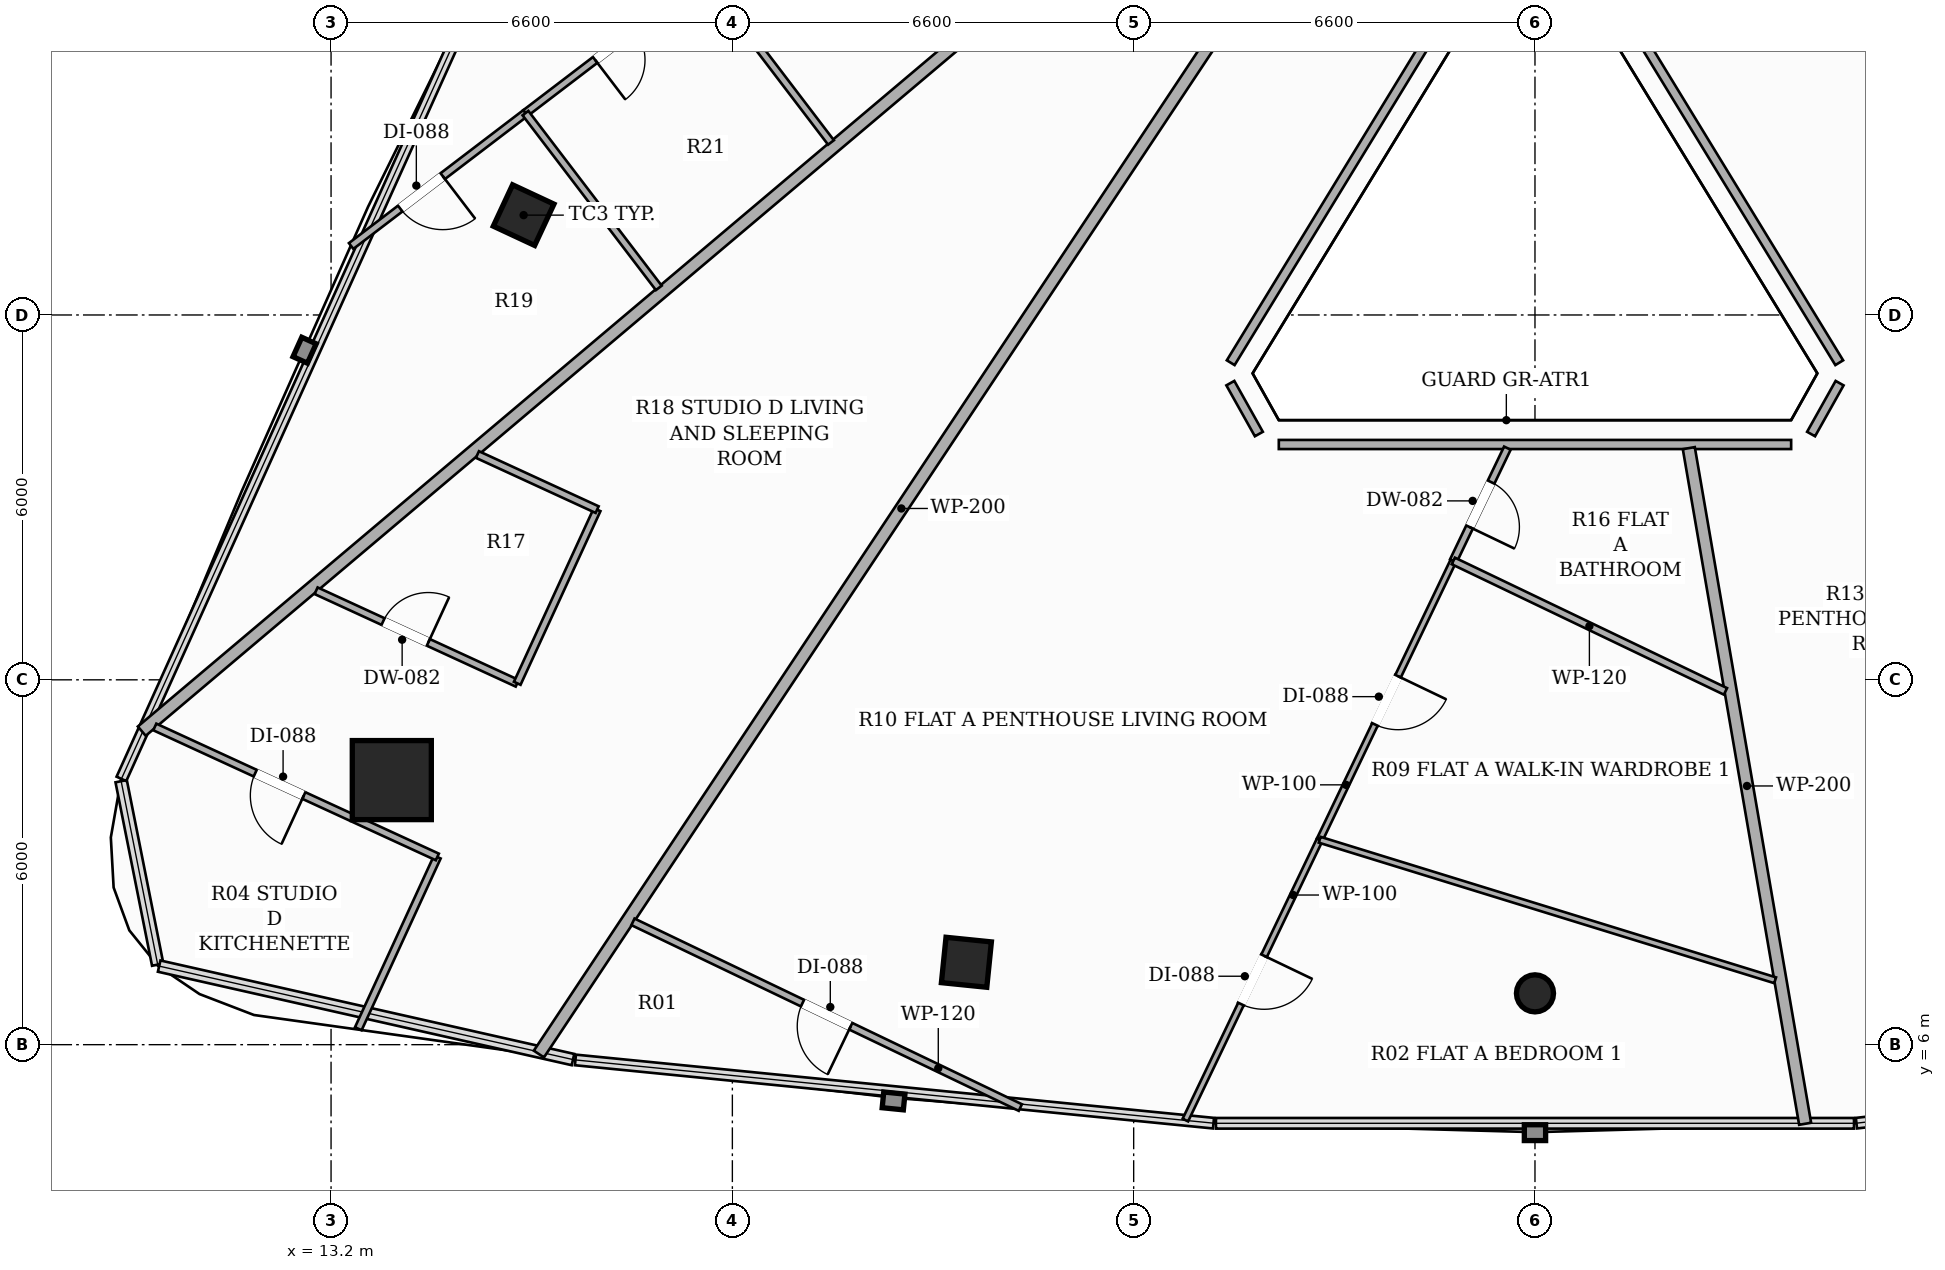
"""IFC4 building model, lengths in metres.
Left out: names, types, materials, properties, quantities, classifications, styles, units other than length and angle.
Written with IfcOpenShell. Run it as: python <this file> out.ifc"""

import sys

from ifc_helpers import new_model, si_unit, direction, frame, frame_2d, origin, origin_2d, place, context, subcontext, project, spatial, rectangle, hollow_rectangle, hollow_circle, extrude, element, fill, save


model = new_model("IFC4")
c1 = context("Model", 3, precision=1e-05, world=origin(), true_north=direction((0.0, 1.0)))
c2 = subcontext(c1, "Body", "Model", "MODEL_VIEW")
j1 = project(units=[si_unit("LENGTHUNIT", "METRE"), si_unit("PLANEANGLEUNIT", "RADIAN")], contexts=[c1])
p1 = place(None, origin())
s1 = spatial("IfcSite", under=j1, at=p1, CompositionType="ELEMENT")
p2 = place(p1, origin())
s2 = spatial("IfcBuilding", under=s1, at=p2, CompositionType="ELEMENT")
p3 = place(p2, frame((0.0, 0.0, 209.6)))
s3 = spatial("IfcBuildingStorey", under=s2, at=p3, CompositionType="ELEMENT", Elevation=209.6)
p4 = place(p3, frame((14.199, 10.351, 0.0), z_axis=(0.0, 0.0, 1.0), x_axis=(1.0, 0.0, 0.0)))
e1 = element("IfcColumn", 1, at=p4, inside=s3, PredefinedType="COLUMN", context=c2, shape_type="SweptSolid", body=[
    extrude(hollow_rectangle(XDim=1.3, YDim=1.3, WallThickness=0.04, at=origin_2d()), origin(), (0.0, 0.0, 1.0), 3.3),
])
for number, where, z_axis, x_axis in (
    (2, (16.367, 19.642, 0.0), (0.0, 0.0, 1.0), (0.423, 0.906, 0.0)),
    (3, (23.649, 7.355, 0.0), (0.0, 0.0, 1.0), (-0.995, 0.101, 0.0)),
):
    element("IfcColumn", number, at=place(p3, frame(where, z_axis=z_axis, x_axis=x_axis)), inside=s3, PredefinedType="COLUMN", context=c2, shape_type="SweptSolid", body=[
        extrude(hollow_rectangle(XDim=0.75, YDim=0.75, WallThickness=0.025, at=origin_2d()), origin(), (0.0, 0.0, 1.0), 3.3),
    ])
p5 = place(p3, frame((33.0, 6.844, 0.0), z_axis=(0.0, 0.0, 1.0), x_axis=(1.0, 0.0, 0.0)))
e4 = element("IfcColumn", 4, at=p5, inside=s3, PredefinedType="COLUMN", context=c2, shape_type="SweptSolid", body=[
    extrude(hollow_circle(Radius=0.305, WallThickness=0.016, at=origin_2d()), origin(), (0.0, 0.0, 1.0), 3.3),
])
p6 = place(p3, frame((33.987, 23.79, 0.0), z_axis=(0.0, 0.0, 1.0), x_axis=(0.521338496894, -0.853349970209, 0.0)))
e5 = element("IfcWall", 5, at=p6, inside=s3, PredefinedType="PARTITIONING", context=c2, shape_type="SweptSolid", body=[
    extrude(rectangle(XDim=7.705, YDim=0.15, at=frame_2d((3.853, 0.0))), origin(), (0.0, 0.0, 1.0), 2.773),
])
p7 = place(p3, frame((38.01, 16.879, 0.0), z_axis=(0.0, 0.0, 1.0), x_axis=(-0.488859069364, -0.872362774481, 0.0)))
e6 = element("IfcWall", 6, at=p7, inside=s3, PredefinedType="PARTITIONING", context=c2, shape_type="SweptSolid", body=[
    extrude(rectangle(XDim=0.959, YDim=0.15, at=frame_2d((0.48, 0.0))), origin(), (0.0, 0.0, 1.0), 3.06),
])
p8 = place(p3, frame((37.213, 15.87, 0.0), z_axis=(0.0, 0.0, 1.0), x_axis=(-1.0, 0.0, 0.0)))
e7 = element("IfcWall", 7, at=p8, inside=s3, PredefinedType="PARTITIONING", context=c2, shape_type="SweptSolid", body=[
    extrude(rectangle(XDim=8.426, YDim=0.15, at=frame_2d((4.213, 0.0))), origin(), (0.0, 0.0, 1.0), 2.773),
])
p9 = place(p3, frame((28.459, 16.042, 0.0), z_axis=(0.0, 0.0, 1.0), x_axis=(-0.488859069364, 0.872362774481, 0.0)))
e8 = element("IfcWall", 8, at=p9, inside=s3, PredefinedType="PARTITIONING", context=c2, shape_type="SweptSolid", body=[
    extrude(rectangle(XDim=0.959, YDim=0.15, at=frame_2d((0.48, 0.0))), origin(), (0.0, 0.0, 1.0), 3.06),
])
p10 = place(p3, frame((27.996, 17.215, 0.0), z_axis=(0.0, 0.0, 1.0), x_axis=(0.521338496894, 0.853349970209, 0.0)))
e9 = element("IfcWall", 9, at=p10, inside=s3, PredefinedType="PARTITIONING", context=c2, shape_type="SweptSolid", body=[
    extrude(rectangle(XDim=7.705, YDim=0.15, at=frame_2d((3.853, 0.0))), origin(), (0.0, 0.0, 1.0), 2.773),
])
p11 = place(p3, frame((35.53, 15.81, 0.0), z_axis=(0.0, 0.0, 1.0), x_axis=(0.169681394536, -0.985498972272, 0.0)))
e10 = element("IfcWall", 10, at=p11, inside=s3, PredefinedType="PARTITIONING", context=c2, shape_type="SweptSolid", body=[
    extrude(rectangle(XDim=11.275, YDim=0.2, at=frame_2d((5.637, 0.0))), origin(), (0.0, 0.0, 1.0), 2.492),
])
p12 = place(p3, frame((16.618, 5.846, 0.0), z_axis=(0.0, 0.0, 1.0), x_axis=(0.553425992232, 0.832898355817, 0.0)))
e11 = element("IfcWall", 11, at=p12, inside=s3, PredefinedType="PARTITIONING", context=c2, shape_type="SweptSolid", body=[
    extrude(rectangle(XDim=21.544, YDim=0.2, at=frame_2d((10.772, 0.0))), origin(), (0.0, 0.0, 1.0), 2.492),
])
p13 = place(p3, frame((50.316, 5.976, 0.0), z_axis=(0.0, 0.0, 1.0), x_axis=(-0.576784728977, 0.816896184603, 0.0)))
e12 = element("IfcWall", 12, at=p13, inside=s3, PredefinedType="PARTITIONING", context=c2, shape_type="SweptSolid", body=[
    extrude(rectangle(XDim=21.807, YDim=0.2, at=frame_2d((10.903, 0.0))), origin(), (0.0, 0.0, 1.0), 2.492),
])
p14 = place(p3, frame((10.087, 11.156, 0.0), z_axis=(0.0, 0.0, 1.0), x_axis=(0.76410924632, 0.645086862127, 0.0)))
e13 = element("IfcWall", 13, at=p14, inside=s3, PredefinedType="PARTITIONING", context=c2, shape_type="SweptSolid", body=[
    extrude(rectangle(XDim=19.585, YDim=0.2, at=frame_2d((9.792, 0.0))), origin(), (0.0, 0.0, 1.0), 2.492),
])
p15 = place(p3, frame((32.546, 15.81, 0.0), z_axis=(0.0, 0.0, 1.0), x_axis=(-0.43214833388, -0.90180253799, 0.0)))
e14 = element("IfcWall", 14, at=p15, inside=s3, PredefinedType="PARTITIONING", context=c2, shape_type="SweptSolid", body=[
    extrude(rectangle(XDim=2.057, YDim=0.12, at=frame_2d((1.028, 0.0))), origin(), (0.0, 0.0, 1.0), 3.06),
])
p16 = place(p15, frame((0.619, 0.0, 0.0)))
e15 = element("IfcOpeningElement", 15, at=p16, cuts=e14, PredefinedType="OPENING", context=c2, shape_type="SweptSolid", body=[
    extrude(rectangle(XDim=0.82, YDim=2.1, at=frame_2d((0.41, 1.05))), frame((0.0, 0.07, 0.0), z_axis=(0.0, -1.0, 0.0), x_axis=(1.0, 0.0, 0.0)), (0.0, 0.0, 1.0), 0.14),
])
p17 = place(p3, frame((24.536, 4.966, 0.0), z_axis=(0.0, 0.0, 1.0), x_axis=(-0.901746721557, 0.432264791721, 0.0)))
e16 = element("IfcWall", 16, at=p17, inside=s3, PredefinedType="PARTITIONING", context=c2, shape_type="SweptSolid", body=[
    extrude(rectangle(XDim=7.065, YDim=0.12, at=frame_2d((3.532, 0.0))), origin(), (0.0, 0.0, 1.0), 2.619),
])
p18 = place(p17, frame((3.093, 0.0, 0.0)))
e17 = element("IfcOpeningElement", 17, at=p18, cuts=e16, PredefinedType="OPENING", context=c2, shape_type="SweptSolid", body=[
    extrude(rectangle(XDim=0.88, YDim=2.1, at=frame_2d((0.44, 1.05))), frame((0.0, 0.07, 0.0), z_axis=(0.0, -1.0, 0.0), x_axis=(1.0, 0.0, 0.0)), (0.0, 0.0, 1.0), 0.14),
])
p19 = place(p3, frame((29.459, 9.37, 0.0), z_axis=(0.0, 0.0, 1.0), x_axis=(-0.43211613455, -0.901817967364, 0.0)))
e18 = element("IfcWall", 18, at=p19, inside=s3, PredefinedType="PARTITIONING", context=c2, shape_type="SweptSolid", body=[
    extrude(rectangle(XDim=5.112, YDim=0.1, at=frame_2d((2.556, 0.0))), origin(), (0.0, 0.0, 1.0), 2.492),
])
p20 = place(p19, frame((2.116, 0.0, 0.0)))
e19 = element("IfcOpeningElement", 19, at=p20, cuts=e18, PredefinedType="OPENING", context=c2, shape_type="SweptSolid", body=[
    extrude(rectangle(XDim=0.88, YDim=2.1, at=frame_2d((0.44, 1.05))), frame((0.0, 0.06, 0.0), z_axis=(0.0, -1.0, 0.0), x_axis=(1.0, 0.0, 0.0)), (0.0, 0.0, 1.0), 0.12),
])
p21 = place(p3, frame((31.657, 13.955, 0.0), z_axis=(0.0, 0.0, 1.0), x_axis=(-0.4322861352, -0.901736489954, 0.0)))
e20 = element("IfcWall", 20, at=p21, inside=s3, PredefinedType="PARTITIONING", context=c2, shape_type="SweptSolid", body=[
    extrude(rectangle(XDim=5.084, YDim=0.1, at=frame_2d((2.542, 0.0))), origin(), (0.0, 0.0, 1.0), 3.06),
])
p22 = place(p21, frame((2.102, 0.0, 0.0)))
e21 = element("IfcOpeningElement", 21, at=p22, cuts=e20, PredefinedType="OPENING", context=c2, shape_type="SweptSolid", body=[
    extrude(rectangle(XDim=0.88, YDim=2.1, at=frame_2d((0.44, 1.05))), frame((0.0, 0.06, 0.0), z_axis=(0.0, -1.0, 0.0), x_axis=(1.0, 0.0, 0.0)), (0.0, 0.0, 1.0), 0.12),
])
p23 = place(p3, frame((36.133, 11.81, 0.0), z_axis=(0.0, 0.0, 1.0), x_axis=(-0.901797658679, 0.432158515826, 0.0)))
e22 = element("IfcWall", 22, at=p23, inside=s3, PredefinedType="PARTITIONING", context=c2, shape_type="SweptSolid", body=[
    extrude(rectangle(XDim=4.964, YDim=0.12, at=frame_2d((2.482, 0.0))), origin(), (0.0, 0.0, 1.0), 2.773),
])
p24 = place(p3, frame((29.459, 9.37, 0.0), z_axis=(0.0, 0.0, 1.0), x_axis=(0.955559226726, -0.294799193044, 0.0)))
e23 = element("IfcWall", 23, at=p24, inside=s3, PredefinedType="PARTITIONING", context=c2, shape_type="SweptSolid", body=[
    extrude(rectangle(XDim=7.839, YDim=0.1, at=frame_2d((3.92, 0.0))), origin(), (0.0, 0.0, 1.0), 2.492),
])
p25 = place(p3, frame((12.954, 13.465, 0.0), z_axis=(0.0, 0.0, 1.0), x_axis=(0.908453283004, -0.41798640241, 0.0)))
e24 = element("IfcWall", 24, at=p25, inside=s3, PredefinedType="PARTITIONING", context=c2, shape_type="SweptSolid", body=[
    extrude(rectangle(XDim=3.641, YDim=0.12, at=frame_2d((1.821, 0.0))), origin(), (0.0, 0.0, 1.0), 2.492),
])
p26 = place(p25, frame((1.212, 0.0, 0.0)))
e25 = element("IfcOpeningElement", 25, at=p26, cuts=e24, PredefinedType="OPENING", context=c2, shape_type="SweptSolid", body=[
    extrude(rectangle(XDim=0.82, YDim=2.1, at=frame_2d((0.41, 1.05))), frame((0.0, 0.07, 0.0), z_axis=(0.0, -1.0, 0.0), x_axis=(1.0, 0.0, 0.0)), (0.0, 0.0, 1.0), 0.14),
])
p27 = place(p3, frame((16.262, 11.943, 0.0), z_axis=(0.0, 0.0, 1.0), x_axis=(0.417964576431, 0.908463324988, 0.0)))
e26 = element("IfcWall", 26, at=p27, inside=s3, PredefinedType="PARTITIONING", context=c2, shape_type="SweptSolid", body=[
    extrude(rectangle(XDim=3.144, YDim=0.12, at=frame_2d((1.572, 0.0))), origin(), (0.0, 0.0, 1.0), 2.565),
])
p28 = place(p3, frame((17.576, 14.799, 0.0), z_axis=(0.0, 0.0, 1.0), x_axis=(-0.908443405033, 0.418007870562, 0.0)))
e27 = element("IfcWall", 27, at=p28, inside=s3, PredefinedType="PARTITIONING", context=c2, shape_type="SweptSolid", body=[
    extrude(rectangle(XDim=2.167, YDim=0.12, at=frame_2d((1.084, 0.0))), origin(), (0.0, 0.0, 1.0), 2.492),
])
p29 = place(p3, frame((13.648, 6.262, 0.0), z_axis=(0.0, 0.0, 1.0), x_axis=(0.418057228076, 0.90842069222, 0.0)))
e28 = element("IfcWall", 28, at=p29, inside=s3, PredefinedType="PARTITIONING", context=c2, shape_type="SweptSolid", body=[
    extrude(rectangle(XDim=3.11, YDim=0.12, at=frame_2d((1.555, 0.0))), origin(), (0.0, 0.0, 1.0), 3.06),
])
p30 = place(p3, frame((14.948, 9.087, 0.0), z_axis=(0.0, 0.0, 1.0), x_axis=(-0.908447683715, 0.417998571712, 0.0)))
e29 = element("IfcWall", 29, at=p30, inside=s3, PredefinedType="PARTITIONING", context=c2, shape_type="SweptSolid", body=[
    extrude(rectangle(XDim=5.115, YDim=0.12, at=frame_2d((2.558, 0.0))), origin(), (0.0, 0.0, 1.0), 3.06),
])
p31 = place(p30, frame((2.417, 0.0, 0.0)))
e30 = element("IfcOpeningElement", 30, at=p31, cuts=e29, PredefinedType="OPENING", context=c2, shape_type="SweptSolid", body=[
    extrude(rectangle(XDim=0.88, YDim=2.1, at=frame_2d((0.44, 1.05))), frame((0.0, 0.07, 0.0), z_axis=(0.0, -1.0, 0.0), x_axis=(1.0, 0.0, 0.0)), (0.0, 0.0, 1.0), 0.14),
])
p32 = place(p3, frame((19.342, 23.566, 0.0), z_axis=(0.0, 0.0, 1.0), x_axis=(-0.795172892053, -0.606382776589, 0.0)))
e31 = element("IfcWall", 31, at=p32, inside=s3, PredefinedType="PARTITIONING", context=c2, shape_type="SweptSolid", body=[
    extrude(rectangle(XDim=3.704, YDim=0.12, at=frame_2d((1.852, 0.0))), origin(), (0.0, 0.0, 1.0), 2.492),
])
p33 = place(p32, frame((1.442, 0.0, 0.0)))
e32 = element("IfcOpeningElement", 32, at=p33, cuts=e31, PredefinedType="OPENING", context=c2, shape_type="SweptSolid", body=[
    extrude(rectangle(XDim=0.82, YDim=2.1, at=frame_2d((0.41, 1.05))), frame((0.0, 0.07, 0.0), z_axis=(0.0, -1.0, 0.0), x_axis=(1.0, 0.0, 0.0)), (0.0, 0.0, 1.0), 0.14),
])
p34 = place(p3, frame((16.397, 21.32, 0.0), z_axis=(0.0, 0.0, 1.0), x_axis=(-0.795204709159, -0.606341051333, 0.0)))
e33 = element("IfcWall", 33, at=p34, inside=s3, PredefinedType="PARTITIONING", context=c2, shape_type="SweptSolid", body=[
    extrude(rectangle(XDim=3.605, YDim=0.12, at=frame_2d((1.803, 0.0))), origin(), (0.0, 0.0, 1.0), 3.06),
])
p35 = place(p34, frame((1.71, 0.0, 0.0)))
e34 = element("IfcOpeningElement", 34, at=p35, cuts=e33, PredefinedType="OPENING", context=c2, shape_type="SweptSolid", body=[
    extrude(rectangle(XDim=0.88, YDim=2.1, at=frame_2d((0.44, 1.05))), frame((0.0, 0.07, 0.0), z_axis=(0.0, -1.0, 0.0), x_axis=(1.0, 0.0, 0.0)), (0.0, 0.0, 1.0), 0.14),
])
p36 = place(p3, frame((18.59, 18.445, 0.0), z_axis=(0.0, 0.0, 1.0), x_axis=(-0.606504882674, 0.795079761591, 0.0)))
e35 = element("IfcWall", 35, at=p36, inside=s3, PredefinedType="PARTITIONING", context=c2, shape_type="SweptSolid", body=[
    extrude(rectangle(XDim=3.616, YDim=0.12, at=frame_2d((1.808, 0.0))), origin(), (0.0, 0.0, 1.0), 2.492),
])
p37 = place(p3, frame((19.342, 23.566, 0.0), z_axis=(0.0, 0.0, 1.0), x_axis=(0.60619754922, -0.795314108589, 0.0)))
e36 = element("IfcWall", 36, at=p37, inside=s3, PredefinedType="PARTITIONING", context=c2, shape_type="SweptSolid", body=[
    extrude(rectangle(XDim=3.431, YDim=0.12, at=frame_2d((1.716, 0.0))), origin(), (0.0, 0.0, 1.0), 2.773),
])
p38 = place(p16, origin())
e37 = element("IfcDoor", 37, at=p38, inside=s3, OperationType="SINGLE_SWING_RIGHT", PredefinedType="DOOR", context=c2, shape_type="SweptSolid", body=[
    extrude(rectangle(XDim=0.82, YDim=2.1, at=frame_2d((0.41, 1.05))), frame((0.0, 0.025, 0.0), z_axis=(0.0, -1.0, 0.0), x_axis=(1.0, 0.0, 0.0)), (0.0, 0.0, 1.0), 0.05),
])
fill(e15, e37)
p39 = place(p18, origin())
e38 = element("IfcDoor", 38, at=p39, inside=s3, OperationType="SINGLE_SWING_LEFT", PredefinedType="DOOR", context=c2, shape_type="SweptSolid", body=[
    extrude(rectangle(XDim=0.88, YDim=2.1, at=frame_2d((0.44, 1.05))), frame((0.0, 0.025, 0.0), z_axis=(0.0, -1.0, 0.0), x_axis=(1.0, 0.0, 0.0)), (0.0, 0.0, 1.0), 0.05),
])
fill(e17, e38)
p40 = place(p20, origin())
e39 = element("IfcDoor", 39, at=p40, inside=s3, OperationType="SINGLE_SWING_LEFT", PredefinedType="DOOR", context=c2, shape_type="SweptSolid", body=[
    extrude(rectangle(XDim=0.88, YDim=2.1, at=frame_2d((0.44, 1.05))), frame((0.0, 0.025, 0.0), z_axis=(0.0, -1.0, 0.0), x_axis=(1.0, 0.0, 0.0)), (0.0, 0.0, 1.0), 0.05),
])
fill(e19, e39)
p41 = place(p22, origin())
e40 = element("IfcDoor", 40, at=p41, inside=s3, OperationType="SINGLE_SWING_LEFT", PredefinedType="DOOR", context=c2, shape_type="SweptSolid", body=[
    extrude(rectangle(XDim=0.88, YDim=2.1, at=frame_2d((0.44, 1.05))), frame((0.0, 0.025, 0.0), z_axis=(0.0, -1.0, 0.0), x_axis=(1.0, 0.0, 0.0)), (0.0, 0.0, 1.0), 0.05),
])
fill(e21, e40)
p42 = place(p26, origin())
e41 = element("IfcDoor", 41, at=p42, inside=s3, OperationType="SINGLE_SWING_RIGHT", PredefinedType="DOOR", context=c2, shape_type="SweptSolid", body=[
    extrude(rectangle(XDim=0.82, YDim=2.1, at=frame_2d((0.41, 1.05))), frame((0.0, 0.025, 0.0), z_axis=(0.0, -1.0, 0.0), x_axis=(1.0, 0.0, 0.0)), (0.0, 0.0, 1.0), 0.05),
])
fill(e25, e41)
p43 = place(p31, origin())
e42 = element("IfcDoor", 42, at=p43, inside=s3, OperationType="SINGLE_SWING_LEFT", PredefinedType="DOOR", context=c2, shape_type="SweptSolid", body=[
    extrude(rectangle(XDim=0.88, YDim=2.1, at=frame_2d((0.44, 1.05))), frame((0.0, 0.025, 0.0), z_axis=(0.0, -1.0, 0.0), x_axis=(1.0, 0.0, 0.0)), (0.0, 0.0, 1.0), 0.05),
])
fill(e30, e42)
p44 = place(p33, origin())
e43 = element("IfcDoor", 43, at=p44, inside=s3, OperationType="SINGLE_SWING_RIGHT", PredefinedType="DOOR", context=c2, shape_type="SweptSolid", body=[
    extrude(rectangle(XDim=0.82, YDim=2.1, at=frame_2d((0.41, 1.05))), frame((0.0, 0.025, 0.0), z_axis=(0.0, -1.0, 0.0), x_axis=(1.0, 0.0, 0.0)), (0.0, 0.0, 1.0), 0.05),
])
fill(e32, e43)
p45 = place(p35, origin())
e44 = element("IfcDoor", 44, at=p45, inside=s3, OperationType="SINGLE_SWING_LEFT", PredefinedType="DOOR", context=c2, shape_type="SweptSolid", body=[
    extrude(rectangle(XDim=0.88, YDim=2.1, at=frame_2d((0.44, 1.05))), frame((0.0, 0.025, 0.0), z_axis=(0.0, -1.0, 0.0), x_axis=(1.0, 0.0, 0.0)), (0.0, 0.0, 1.0), 0.05),
])
fill(e34, e44)
save(model, sys.argv[1])
